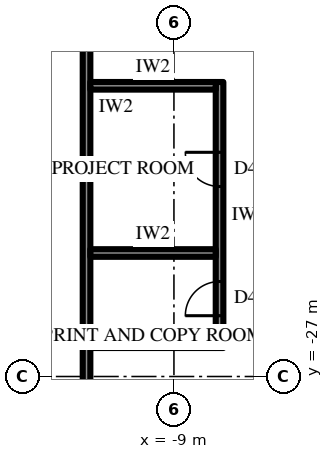
"""IFC4 building model, lengths in metres.
Left out: names, types, materials, properties, quantities, classifications, styles, units other than length and angle.
Written with IfcOpenShell. Run it as: python <this file> out.ifc"""

import sys

from ifc_helpers import new_model, si_unit, direction, frame, frame_2d, origin, place, context, subcontext, project, spatial, rectangle, extrude, element, fill, save


model = new_model("IFC4")
c1 = context("Model", 3, precision=1e-05, world=origin(), true_north=direction((0.0, 1.0)))
c2 = subcontext(c1, "Body", "Model", "MODEL_VIEW")
j1 = project(units=[si_unit("LENGTHUNIT", "METRE"), si_unit("PLANEANGLEUNIT", "RADIAN")], contexts=[c1])
p1 = place(None, origin())
s1 = spatial("IfcSite", under=j1, at=p1, CompositionType="ELEMENT")
p2 = place(p1, origin())
s2 = spatial("IfcBuilding", under=s1, at=p2, CompositionType="ELEMENT")
p3 = place(p2, frame((0.0, 0.0, 186.7)))
s3 = spatial("IfcBuildingStorey", under=s2, at=p3, CompositionType="ELEMENT", Elevation=186.7)
p4 = place(p3, frame((-11.3, -12.3, 0.0), z_axis=(0.0, 0.0, 1.0), x_axis=(0.0, -1.0, 0.0)))
e1 = element("IfcWall", 1, at=p4, inside=s3, PredefinedType="PARTITIONING", context=c2, shape_type="SweptSolid", body=[
    extrude(rectangle(XDim=19.0, YDim=0.2, at=frame_2d((9.5, 0.0))), origin(), (0.0, 0.0, 1.0), 4.0),
])
p5 = place(p4, frame((1.4, 0.0, 0.0)))
e2 = element("IfcOpeningElement", 2, at=p5, cuts=e1, PredefinedType="OPENING", context=c2, shape_type="SweptSolid", body=[
    extrude(rectangle(XDim=1.0, YDim=2.2, at=frame_2d((0.5, 1.1))), frame((0.0, 0.11, 0.0), z_axis=(0.0, -1.0, 0.0), x_axis=(1.0, 0.0, 0.0)), (0.0, 0.0, 1.0), 0.22),
])
p6 = place(p3, frame((-7.8, -19.25, 0.0), z_axis=(0.0, 0.0, 1.0), x_axis=(0.0, -1.0, 0.0)))
e3 = element("IfcWall", 3, at=p6, inside=s3, PredefinedType="PARTITIONING", context=c2, shape_type="SweptSolid", body=[
    extrude(rectangle(XDim=7.0, YDim=0.2, at=frame_2d((3.5, 0.0))), origin(), (0.0, 0.0, 1.0), 4.0),
])
p7 = place(p6, frame((1.85, 0.0, 0.0)))
e4 = element("IfcOpeningElement", 4, at=p7, cuts=e3, PredefinedType="OPENING", context=c2, shape_type="SweptSolid", body=[
    extrude(rectangle(XDim=0.9, YDim=2.2, at=frame_2d((0.45, 1.1))), frame((0.0, 0.11, 0.0), z_axis=(0.0, -1.0, 0.0), x_axis=(1.0, 0.0, 0.0)), (0.0, 0.0, 1.0), 0.22),
])
p8 = place(p6, frame((5.25, 0.0, 0.0)))
e5 = element("IfcOpeningElement", 5, at=p8, cuts=e3, PredefinedType="OPENING", context=c2, shape_type="SweptSolid", body=[
    extrude(rectangle(XDim=0.9, YDim=2.2, at=frame_2d((0.45, 1.1))), frame((0.0, 0.11, 0.0), z_axis=(0.0, -1.0, 0.0), x_axis=(1.0, 0.0, 0.0)), (0.0, 0.0, 1.0), 0.22),
])
for number, where, z_axis, x_axis in (
    (6, (-11.2, -19.35, 0.0), (0.0, 0.0, 1.0), (1.0, 0.0, 0.0)),
    (7, (-11.2, -23.75, 0.0), (0.0, 0.0, 1.0), (1.0, 0.0, 0.0)),
    (8, (-11.2, -26.15, 0.0), (0.0, 0.0, 1.0), (1.0, 0.0, 0.0)),
):
    element("IfcWall", number, at=place(p3, frame(where, z_axis=z_axis, x_axis=x_axis)), inside=s3, PredefinedType="PARTITIONING", context=c2, shape_type="SweptSolid", body=[
        extrude(rectangle(XDim=3.3, YDim=0.2, at=frame_2d((1.65, 0.0))), origin(), (0.0, 0.0, 1.0), 4.0),
    ])
p9 = place(p7, frame((0.9, 0.0, 0.0), z_axis=(0.0, 0.0, 1.0), x_axis=(-1.0, 0.0, 0.0)))
e9 = element("IfcDoor", 9, at=p9, inside=s3, OperationType="SINGLE_SWING_LEFT", PredefinedType="DOOR", context=c2, shape_type="SweptSolid", body=[
    extrude(rectangle(XDim=0.9, YDim=2.2, at=frame_2d((0.45, 1.1))), frame((0.0, 0.025, 0.0), z_axis=(0.0, -1.0, 0.0), x_axis=(1.0, 0.0, 0.0)), (0.0, 0.0, 1.0), 0.05),
])
fill(e4, e9)
p10 = place(p8, frame((0.9, 0.0, 0.0), z_axis=(0.0, 0.0, 1.0), x_axis=(-1.0, 0.0, 0.0)))
e10 = element("IfcDoor", 10, at=p10, inside=s3, OperationType="SINGLE_SWING_RIGHT", PredefinedType="DOOR", context=c2, shape_type="SweptSolid", body=[
    extrude(rectangle(XDim=0.9, YDim=2.2, at=frame_2d((0.45, 1.1))), frame((0.0, 0.025, 0.0), z_axis=(0.0, -1.0, 0.0), x_axis=(1.0, 0.0, 0.0)), (0.0, 0.0, 1.0), 0.05),
])
fill(e5, e10)
save(model, sys.argv[1])
